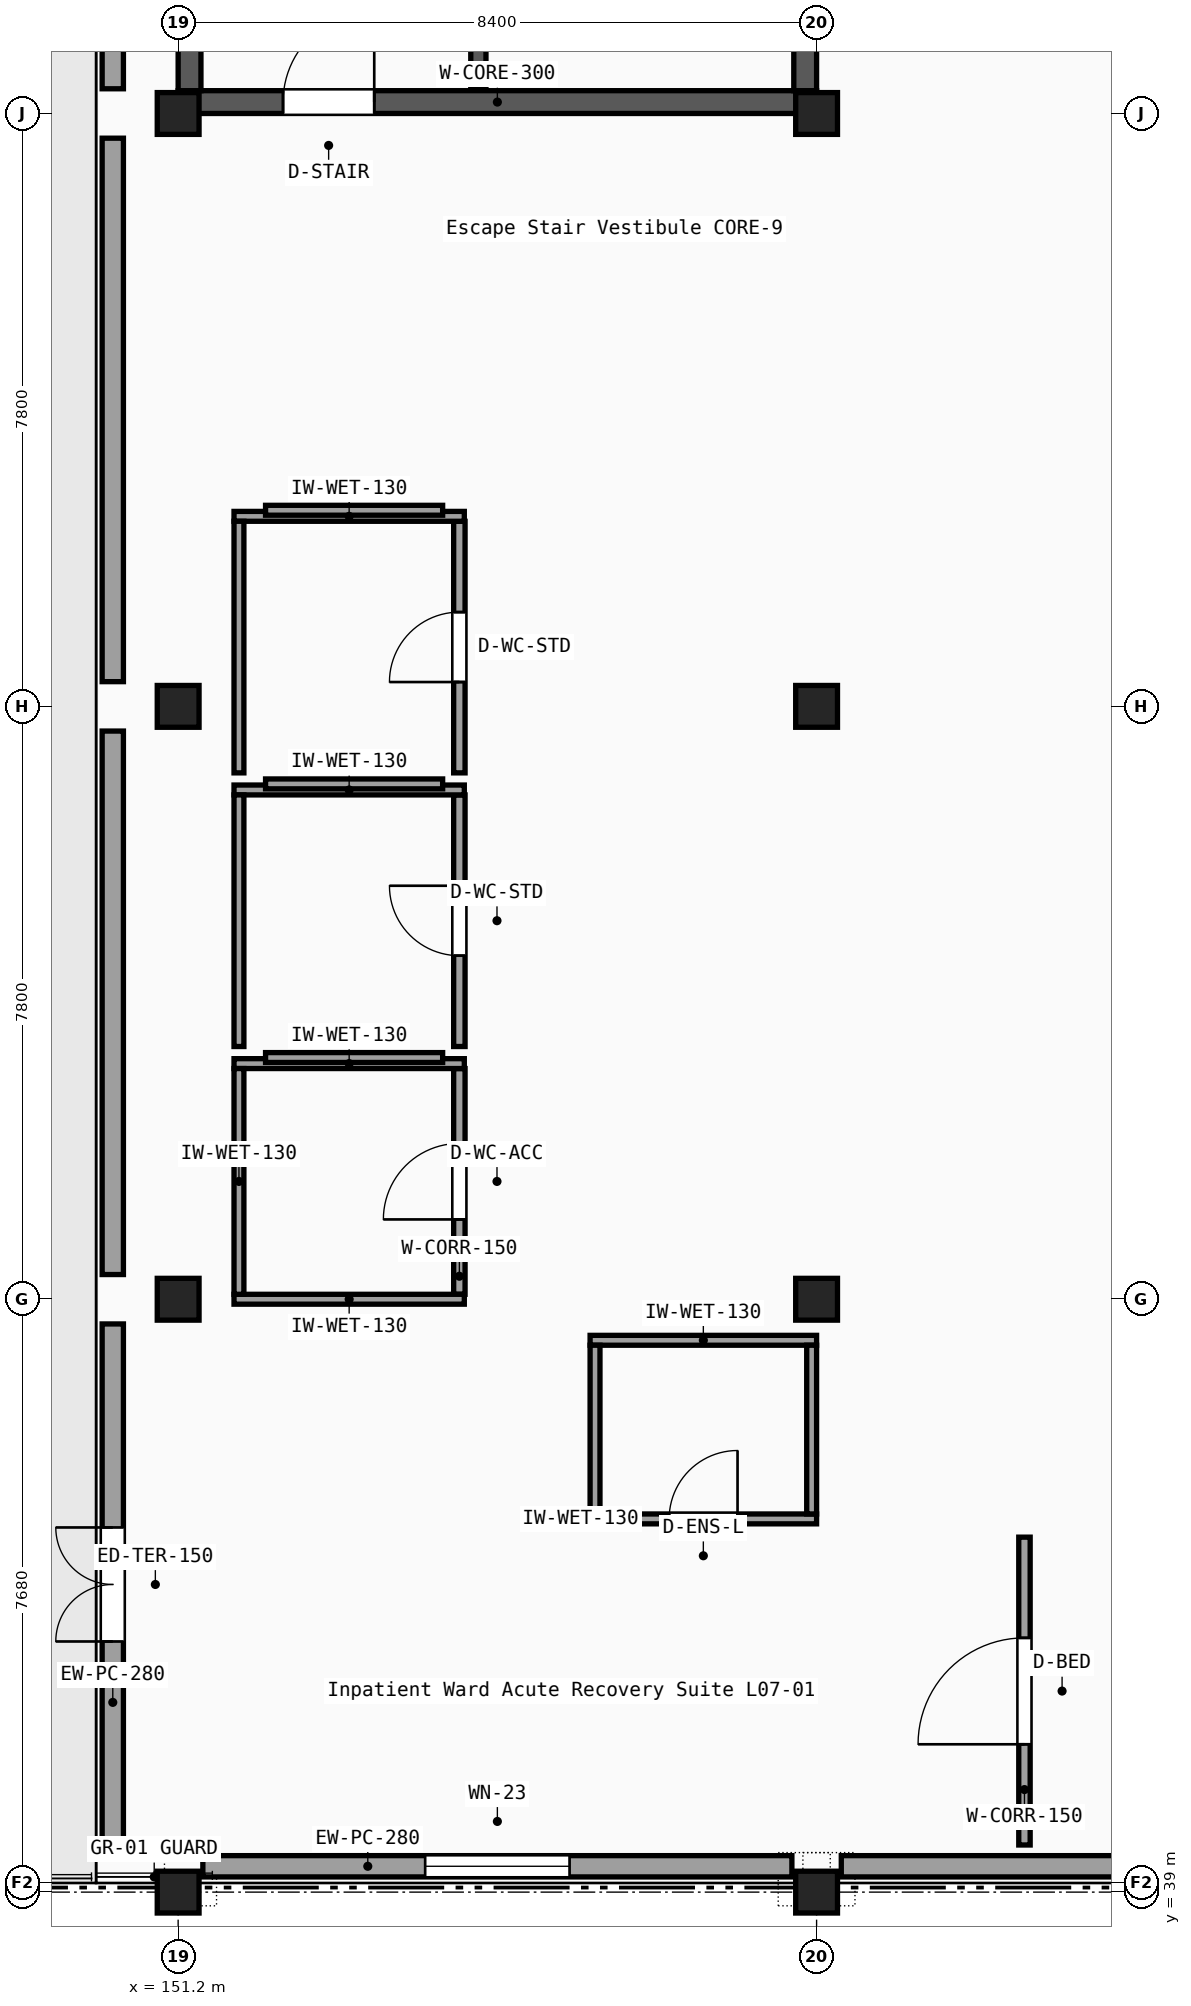
"""IFC4 building model, lengths in metres.
Left out: names, types, materials, properties, quantities, classifications, styles, units other than length and angle.
Written with IfcOpenShell. Run it as: python <this file> out.ifc"""

import sys

from ifc_helpers import new_model, si_unit, direction, frame, frame_2d, origin, origin_2d, place, context, subcontext, project, spatial, rectangle, extrude, element, fill, save


model = new_model("IFC4")
c1 = context("Model", 3, precision=1e-05, world=origin(), true_north=direction((0.0, 1.0)))
c2 = subcontext(c1, "Body", "Model", "MODEL_VIEW")
j1 = project(units=[si_unit("LENGTHUNIT", "METRE"), si_unit("PLANEANGLEUNIT", "RADIAN")], contexts=[c1])
p1 = place(None, origin())
s1 = spatial("IfcSite", under=j1, at=p1, CompositionType="ELEMENT")
p2 = place(p1, origin())
s2 = spatial("IfcBuilding", under=s1, at=p2, CompositionType="ELEMENT")
p3 = place(p2, frame((0.0, 0.0, 31.05)))
s3 = spatial("IfcBuildingStorey", under=s2, at=p3, CompositionType="ELEMENT", Elevation=31.05)
for number, where, z_axis, x_axis in (
    (1, (151.2, 39.0, 0.0), (0.0, 0.0, 1.0), (1.0, 0.0, 0.0)),
    (2, (151.2, 46.8, 0.0), (0.0, 0.0, 1.0), (1.0, 0.0, 0.0)),
    (3, (151.2, 54.6, 0.0), (0.0, 0.0, 1.0), (1.0, 0.0, 0.0)),
    (4, (151.2, 62.4, 0.0), (0.0, 0.0, 1.0), (1.0, 0.0, 0.0)),
    (5, (159.6, 39.0, 0.0), (0.0, 0.0, 1.0), (1.0, 0.0, 0.0)),
    (6, (159.6, 46.8, 0.0), (0.0, 0.0, 1.0), (1.0, 0.0, 0.0)),
    (7, (159.6, 54.6, 0.0), (0.0, 0.0, 1.0), (1.0, 0.0, 0.0)),
    (8, (159.6, 62.4, 0.0), (0.0, 0.0, 1.0), (1.0, 0.0, 0.0)),
):
    element("IfcColumn", number, at=place(p3, frame(where, z_axis=z_axis, x_axis=x_axis)), inside=s3, PredefinedType="COLUMN", context=c2, shape_type="SweptSolid", body=[
        extrude(rectangle(XDim=0.55, YDim=0.55, at=origin_2d()), origin(), (0.0, 0.0, 1.0), 4.05),
    ])
p4 = place(p3, frame((150.34, 39.56, 0.0), z_axis=(0.0, 0.0, 1.0), x_axis=(0.0, 1.0, 0.0)))
e9 = element("IfcWall", 9, at=p4, inside=s3, PredefinedType="SOLIDWALL", context=c2, shape_type="SweptSolid", body=[
    extrude(rectangle(XDim=6.915, YDim=0.28, at=frame_2d((3.458, 0.0))), origin(), (0.0, 0.0, 1.0), 3.77),
])
p5 = place(p4, frame((2.738, 0.0, 0.0)))
e10 = element("IfcOpeningElement", 10, at=p5, cuts=e9, PredefinedType="OPENING", context=c2, shape_type="SweptSolid", body=[
    extrude(rectangle(XDim=1.5, YDim=2.2, at=frame_2d((0.75, 1.1))), frame((0.0, 0.15, 0.0), z_axis=(0.0, -1.0, 0.0), x_axis=(1.0, 0.0, 0.0)), (0.0, 0.0, 1.0), 0.3),
])
for number, where, z_axis, x_axis in (
    (11, (150.34, 47.125, 0.0), (0.0, 0.0, 1.0), (0.0, 1.0, 0.0)),
    (12, (150.34, 54.925, 0.0), (0.0, 0.0, 1.0), (0.0, 1.0, 0.0)),
    (13, (150.34, 62.725, 0.0), (0.0, 0.0, 1.0), (0.0, 1.0, 0.0)),
):
    element("IfcWall", number, at=place(p3, frame(where, z_axis=z_axis, x_axis=x_axis)), inside=s3, PredefinedType="SOLIDWALL", context=c2, shape_type="SweptSolid", body=[
        extrude(rectangle(XDim=7.15, YDim=0.28, at=frame_2d((3.575, 0.0))), origin(), (0.0, 0.0, 1.0), 3.77),
    ])
p6 = place(p3, frame((151.525, 39.34, 0.0), z_axis=(0.0, 0.0, 1.0), x_axis=(1.0, 0.0, 0.0)))
e14 = element("IfcWall", 14, at=p6, inside=s3, PredefinedType="SOLIDWALL", context=c2, shape_type="SweptSolid", body=[
    extrude(rectangle(XDim=7.75, YDim=0.28, at=frame_2d((3.875, 0.0))), origin(), (0.0, 0.0, 1.0), 3.34),
])
p7 = place(p6, frame((2.925, 0.0, 0.85)))
e15 = element("IfcOpeningElement", 15, at=p7, cuts=e14, PredefinedType="OPENING", context=c2, shape_type="SweptSolid", body=[
    extrude(rectangle(XDim=1.9, YDim=1.65, at=frame_2d((0.95, 0.825))), frame((0.0, 0.15, 0.0), z_axis=(0.0, -1.0, 0.0), x_axis=(1.0, 0.0, 0.0)), (0.0, 0.0, 1.0), 0.3),
])
p8 = place(p3, frame((159.925, 39.34, 0.0), z_axis=(0.0, 0.0, 1.0), x_axis=(1.0, 0.0, 0.0)))
e16 = element("IfcWall", 16, at=p8, inside=s3, PredefinedType="SOLIDWALL", context=c2, shape_type="SweptSolid", body=[
    extrude(rectangle(XDim=7.875, YDim=0.28, at=frame_2d((3.938, 0.0))), origin(), (0.0, 0.0, 1.0), 3.34),
])
p9 = place(p3, frame((151.2, 62.55, 0.0), z_axis=(0.0, 0.0, 1.0), x_axis=(1.0, 0.0, 0.0)))
e17 = element("IfcWall", 17, at=p9, inside=s3, PredefinedType="SHEAR", context=c2, shape_type="SweptSolid", body=[
    extrude(rectangle(XDim=8.4, YDim=0.3, at=frame_2d((4.2, 0.0))), origin(), (0.0, 0.0, 1.0), 3.81),
])
p10 = place(p9, frame((1.38, 0.0, 0.0)))
e18 = element("IfcOpeningElement", 18, at=p10, cuts=e17, PredefinedType="OPENING", context=c2, shape_type="SweptSolid", body=[
    extrude(rectangle(XDim=1.2, YDim=2.15, at=frame_2d((0.6, 1.075))), frame((0.0, 0.16, 0.0), z_axis=(0.0, -1.0, 0.0), x_axis=(1.0, 0.0, 0.0)), (0.0, 0.0, 1.0), 0.32),
])
for number, where, z_axis, x_axis in (
    (19, (151.35, 62.7, 0.0), (0.0, 0.0, 1.0), (0.0, 1.0, 0.0)),
    (20, (159.45, 62.7, 0.0), (0.0, 0.0, 1.0), (0.0, 1.0, 0.0)),
):
    element("IfcWall", number, at=place(p3, frame(where, z_axis=z_axis, x_axis=x_axis)), inside=s3, PredefinedType="SHEAR", context=c2, shape_type="SweptSolid", body=[
        extrude(rectangle(XDim=7.2, YDim=0.3, at=frame_2d((3.6, 0.0))), origin(), (0.0, 0.0, 1.0), 3.81),
    ])
p11 = place(p3, frame((155.15, 62.72, 0.0), z_axis=(0.0, 0.0, 1.0), x_axis=(0.0, 1.0, 0.0)))
e21 = element("IfcWall", 21, at=p11, inside=s3, PredefinedType="SHEAR", context=c2, shape_type="SweptSolid", body=[
    extrude(rectangle(XDim=7.16, YDim=0.2, at=frame_2d((3.58, 0.0))), origin(), (0.0, 0.0, 1.0), 3.81),
])
p12 = place(p3, frame((154.9, 46.865, 0.0), z_axis=(0.0, 0.0, 1.0), x_axis=(0.0, 1.0, 0.0)))
e22 = element("IfcWall", 22, at=p12, inside=s3, PredefinedType="PARTITIONING", context=c2, shape_type="SweptSolid", body=[
    extrude(rectangle(XDim=2.97, YDim=0.15, at=frame_2d((1.485, 0.0))), origin(), (0.0, 0.0, 1.0), 3.34),
])
p13 = place(p12, frame((0.985, 0.0, 0.0)))
e23 = element("IfcOpeningElement", 23, at=p13, cuts=e22, PredefinedType="OPENING", context=c2, shape_type="SweptSolid", body=[
    extrude(rectangle(XDim=1.0, YDim=2.15, at=frame_2d((0.5, 1.075))), frame((0.0, 0.085, 0.0), z_axis=(0.0, -1.0, 0.0), x_axis=(1.0, 0.0, 0.0)), (0.0, 0.0, 1.0), 0.17),
])
p14 = place(p3, frame((151.935, 46.8, 0.0), z_axis=(0.0, 0.0, 1.0), x_axis=(1.0, 0.0, 0.0)))
e24 = element("IfcWall", 24, at=p14, inside=s3, PredefinedType="PARTITIONING", context=c2, shape_type="SweptSolid", body=[
    extrude(rectangle(XDim=3.03, YDim=0.13, at=frame_2d((1.515, 0.0))), origin(), (0.0, 0.0, 1.0), 3.34),
])
p15 = place(p3, frame((151.935, 49.9, 0.0), z_axis=(0.0, 0.0, 1.0), x_axis=(1.0, 0.0, 0.0)))
e25 = element("IfcWall", 25, at=p15, inside=s3, PredefinedType="PARTITIONING", context=c2, shape_type="SweptSolid", body=[
    extrude(rectangle(XDim=3.03, YDim=0.13, at=frame_2d((1.515, 0.0))), origin(), (0.0, 0.0, 1.0), 3.77),
])
p16 = place(p3, frame((152.0, 46.865, 0.0), z_axis=(0.0, 0.0, 1.0), x_axis=(0.0, 1.0, 0.0)))
e26 = element("IfcWall", 26, at=p16, inside=s3, PredefinedType="PARTITIONING", context=c2, shape_type="SweptSolid", body=[
    extrude(rectangle(XDim=2.97, YDim=0.13, at=frame_2d((1.485, 0.0))), origin(), (0.0, 0.0, 1.0), 3.34),
])
p17 = place(p3, frame((152.35, 49.98, 0.0), z_axis=(0.0, 0.0, 1.0), x_axis=(1.0, 0.0, 0.0)))
e27 = element("IfcWall", 27, at=p17, inside=s3, PredefinedType="PARTITIONING", context=c2, shape_type="SweptSolid", body=[
    extrude(rectangle(XDim=2.33, YDim=0.13, at=frame_2d((1.165, 0.0))), origin(), (0.0, 0.0, 1.0), 3.77),
])
p18 = place(p3, frame((154.9, 50.125, 0.0), z_axis=(0.0, 0.0, 1.0), x_axis=(0.0, 1.0, 0.0)))
e28 = element("IfcWall", 28, at=p18, inside=s3, PredefinedType="PARTITIONING", context=c2, shape_type="SweptSolid", body=[
    extrude(rectangle(XDim=3.31, YDim=0.15, at=frame_2d((1.655, 0.0))), origin(), (0.0, 0.0, 1.0), 3.77),
])
p19 = place(p18, frame((1.195, 0.0, 0.0)))
e29 = element("IfcOpeningElement", 29, at=p19, cuts=e28, PredefinedType="OPENING", context=c2, shape_type="SweptSolid", body=[
    extrude(rectangle(XDim=0.92, YDim=2.15, at=frame_2d((0.46, 1.075))), frame((0.0, 0.085, 0.0), z_axis=(0.0, -1.0, 0.0), x_axis=(1.0, 0.0, 0.0)), (0.0, 0.0, 1.0), 0.17),
])
p20 = place(p3, frame((151.935, 53.5, 0.0), z_axis=(0.0, 0.0, 1.0), x_axis=(1.0, 0.0, 0.0)))
e30 = element("IfcWall", 30, at=p20, inside=s3, PredefinedType="PARTITIONING", context=c2, shape_type="SweptSolid", body=[
    extrude(rectangle(XDim=3.03, YDim=0.13, at=frame_2d((1.515, 0.0))), origin(), (0.0, 0.0, 1.0), 3.77),
])
p21 = place(p3, frame((152.0, 50.125, 0.0), z_axis=(0.0, 0.0, 1.0), x_axis=(0.0, 1.0, 0.0)))
e31 = element("IfcWall", 31, at=p21, inside=s3, PredefinedType="PARTITIONING", context=c2, shape_type="SweptSolid", body=[
    extrude(rectangle(XDim=3.31, YDim=0.13, at=frame_2d((1.655, 0.0))), origin(), (0.0, 0.0, 1.0), 3.77),
])
p22 = place(p3, frame((152.35, 53.58, 0.0), z_axis=(0.0, 0.0, 1.0), x_axis=(1.0, 0.0, 0.0)))
e32 = element("IfcWall", 32, at=p22, inside=s3, PredefinedType="PARTITIONING", context=c2, shape_type="SweptSolid", body=[
    extrude(rectangle(XDim=2.33, YDim=0.13, at=frame_2d((1.165, 0.0))), origin(), (0.0, 0.0, 1.0), 3.77),
])
p23 = place(p3, frame((154.9, 53.725, 0.0), z_axis=(0.0, 0.0, 1.0), x_axis=(0.0, 1.0, 0.0)))
e33 = element("IfcWall", 33, at=p23, inside=s3, PredefinedType="PARTITIONING", context=c2, shape_type="SweptSolid", body=[
    extrude(rectangle(XDim=3.31, YDim=0.15, at=frame_2d((1.655, 0.0))), origin(), (0.0, 0.0, 1.0), 3.34),
])
p24 = place(p23, frame((1.195, 0.0, 0.0)))
e34 = element("IfcOpeningElement", 34, at=p24, cuts=e33, PredefinedType="OPENING", context=c2, shape_type="SweptSolid", body=[
    extrude(rectangle(XDim=0.92, YDim=2.15, at=frame_2d((0.46, 1.075))), frame((0.0, 0.085, 0.0), z_axis=(0.0, -1.0, 0.0), x_axis=(1.0, 0.0, 0.0)), (0.0, 0.0, 1.0), 0.17),
])
p25 = place(p3, frame((151.935, 57.1, 0.0), z_axis=(0.0, 0.0, 1.0), x_axis=(1.0, 0.0, 0.0)))
e35 = element("IfcWall", 35, at=p25, inside=s3, PredefinedType="PARTITIONING", context=c2, shape_type="SweptSolid", body=[
    extrude(rectangle(XDim=3.03, YDim=0.13, at=frame_2d((1.515, 0.0))), origin(), (0.0, 0.0, 1.0), 3.77),
])
p26 = place(p3, frame((152.0, 53.725, 0.0), z_axis=(0.0, 0.0, 1.0), x_axis=(0.0, 1.0, 0.0)))
e36 = element("IfcWall", 36, at=p26, inside=s3, PredefinedType="PARTITIONING", context=c2, shape_type="SweptSolid", body=[
    extrude(rectangle(XDim=3.31, YDim=0.13, at=frame_2d((1.655, 0.0))), origin(), (0.0, 0.0, 1.0), 3.34),
])
p27 = place(p3, frame((152.35, 57.18, 0.0), z_axis=(0.0, 0.0, 1.0), x_axis=(1.0, 0.0, 0.0)))
e37 = element("IfcWall", 37, at=p27, inside=s3, PredefinedType="PARTITIONING", context=c2, shape_type="SweptSolid", body=[
    extrude(rectangle(XDim=2.33, YDim=0.13, at=frame_2d((1.165, 0.0))), origin(), (0.0, 0.0, 1.0), 3.77),
])
p28 = place(p3, frame((162.335, 39.62, 0.0), z_axis=(0.0, 0.0, 1.0), x_axis=(0.0, 1.0, 0.0)))
e38 = element("IfcWall", 38, at=p28, inside=s3, PredefinedType="PARTITIONING", context=c2, shape_type="SweptSolid", body=[
    extrude(rectangle(XDim=4.05, YDim=0.15, at=frame_2d((2.025, 0.0))), origin(), (0.0, 0.0, 1.0), 3.77),
])
p29 = place(p28, frame((1.325, 0.0, 0.0)))
e39 = element("IfcOpeningElement", 39, at=p29, cuts=e38, PredefinedType="OPENING", context=c2, shape_type="SweptSolid", body=[
    extrude(rectangle(XDim=1.4, YDim=2.2, at=frame_2d((0.7, 1.1))), frame((0.0, 0.085, 0.0), z_axis=(0.0, -1.0, 0.0), x_axis=(1.0, 0.0, 0.0)), (0.0, 0.0, 1.0), 0.17),
])
p30 = place(p3, frame((156.62, 43.91, 0.0), z_axis=(0.0, 0.0, 1.0), x_axis=(1.0, 0.0, 0.0)))
e40 = element("IfcWall", 40, at=p30, inside=s3, PredefinedType="PARTITIONING", context=c2, shape_type="SweptSolid", body=[
    extrude(rectangle(XDim=2.98, YDim=0.13, at=frame_2d((1.49, 0.0))), origin(), (0.0, 0.0, 1.0), 3.55),
])
p31 = place(p30, frame((1.04, 0.0, 0.0)))
e41 = element("IfcOpeningElement", 41, at=p31, cuts=e40, PredefinedType="OPENING", context=c2, shape_type="SweptSolid", body=[
    extrude(rectangle(XDim=0.9, YDim=2.1, at=frame_2d((0.45, 1.05))), frame((0.0, 0.075, 0.0), z_axis=(0.0, -1.0, 0.0), x_axis=(1.0, 0.0, 0.0)), (0.0, 0.0, 1.0), 0.15),
])
p32 = place(p3, frame((156.62, 46.26, 0.0), z_axis=(0.0, 0.0, 1.0), x_axis=(1.0, 0.0, 0.0)))
e42 = element("IfcWall", 42, at=p32, inside=s3, PredefinedType="PARTITIONING", context=c2, shape_type="SweptSolid", body=[
    extrude(rectangle(XDim=2.98, YDim=0.13, at=frame_2d((1.49, 0.0))), origin(), (0.0, 0.0, 1.0), 3.55),
])
p33 = place(p3, frame((156.685, 43.975, 0.0), z_axis=(0.0, 0.0, 1.0), x_axis=(0.0, 1.0, 0.0)))
e43 = element("IfcWall", 43, at=p33, inside=s3, PredefinedType="PARTITIONING", context=c2, shape_type="SweptSolid", body=[
    extrude(rectangle(XDim=2.22, YDim=0.13, at=frame_2d((1.11, 0.0))), origin(), (0.0, 0.0, 1.0), 3.77),
])
p34 = place(p3, frame((159.535, 43.975, 0.0), z_axis=(0.0, 0.0, 1.0), x_axis=(0.0, 1.0, 0.0)))
e44 = element("IfcWall", 44, at=p34, inside=s3, PredefinedType="PARTITIONING", context=c2, shape_type="SweptSolid", body=[
    extrude(rectangle(XDim=2.22, YDim=0.13, at=frame_2d((1.11, 0.0))), origin(), (0.0, 0.0, 1.0), 3.55),
])
p35 = place(p5, origin())
e45 = element("IfcDoor", 45, at=p35, inside=s3, OperationType="DOUBLE_DOOR_SINGLE_SWING", PredefinedType="DOOR", context=c2, shape_type="SweptSolid", body=[
    extrude(rectangle(XDim=1.5, YDim=2.2, at=frame_2d((0.75, 1.1))), frame((0.0, 0.025, 0.0), z_axis=(0.0, -1.0, 0.0), x_axis=(1.0, 0.0, 0.0)), (0.0, 0.0, 1.0), 0.05),
])
fill(e10, e45)
p36 = place(p7, origin())
e46 = element("IfcWindow", 46, at=p36, inside=s3, PartitioningType="SINGLE_PANEL", PredefinedType="WINDOW", context=c2, shape_type="SweptSolid", body=[
    extrude(rectangle(XDim=1.9, YDim=1.65, at=frame_2d((0.95, 0.825))), frame((0.0, 0.03, 0.0), z_axis=(0.0, -1.0, 0.0), x_axis=(1.0, 0.0, 0.0)), (0.0, 0.0, 1.0), 0.06),
])
fill(e15, e46)
p37 = place(p10, origin())
e47 = element("IfcDoor", 47, at=p37, inside=s3, OperationType="SINGLE_SWING_RIGHT", PredefinedType="DOOR", context=c2, shape_type="SweptSolid", body=[
    extrude(rectangle(XDim=1.2, YDim=2.15, at=frame_2d((0.6, 1.075))), frame((0.0, 0.025, 0.0), z_axis=(0.0, -1.0, 0.0), x_axis=(1.0, 0.0, 0.0)), (0.0, 0.0, 1.0), 0.05),
])
fill(e18, e47)
p38 = place(p13, origin())
e48 = element("IfcDoor", 48, at=p38, inside=s3, OperationType="SINGLE_SWING_LEFT", PredefinedType="DOOR", context=c2, shape_type="SweptSolid", body=[
    extrude(rectangle(XDim=1.0, YDim=2.15, at=frame_2d((0.5, 1.075))), frame((0.0, 0.025, 0.0), z_axis=(0.0, -1.0, 0.0), x_axis=(1.0, 0.0, 0.0)), (0.0, 0.0, 1.0), 0.05),
])
fill(e23, e48)
p39 = place(p19, origin())
e49 = element("IfcDoor", 49, at=p39, inside=s3, OperationType="SINGLE_SWING_RIGHT", PredefinedType="DOOR", context=c2, shape_type="SweptSolid", body=[
    extrude(rectangle(XDim=0.92, YDim=2.15, at=frame_2d((0.46, 1.075))), frame((0.0, 0.025, 0.0), z_axis=(0.0, -1.0, 0.0), x_axis=(1.0, 0.0, 0.0)), (0.0, 0.0, 1.0), 0.05),
])
fill(e29, e49)
p40 = place(p24, origin())
e50 = element("IfcDoor", 50, at=p40, inside=s3, OperationType="SINGLE_SWING_LEFT", PredefinedType="DOOR", context=c2, shape_type="SweptSolid", body=[
    extrude(rectangle(XDim=0.92, YDim=2.15, at=frame_2d((0.46, 1.075))), frame((0.0, 0.025, 0.0), z_axis=(0.0, -1.0, 0.0), x_axis=(1.0, 0.0, 0.0)), (0.0, 0.0, 1.0), 0.05),
])
fill(e34, e50)
p41 = place(p29, origin())
e51 = element("IfcDoor", 51, at=p41, inside=s3, OperationType="SINGLE_SWING_LEFT", PredefinedType="DOOR", context=c2, shape_type="SweptSolid", body=[
    extrude(rectangle(XDim=1.4, YDim=2.2, at=frame_2d((0.7, 1.1))), frame((0.0, 0.025, 0.0), z_axis=(0.0, -1.0, 0.0), x_axis=(1.0, 0.0, 0.0)), (0.0, 0.0, 1.0), 0.05),
])
fill(e39, e51)
p42 = place(p31, origin())
e52 = element("IfcDoor", 52, at=p42, inside=s3, OperationType="SINGLE_SWING_RIGHT", PredefinedType="DOOR", context=c2, shape_type="SweptSolid", body=[
    extrude(rectangle(XDim=0.9, YDim=2.1, at=frame_2d((0.45, 1.05))), frame((0.0, 0.025, 0.0), z_axis=(0.0, -1.0, 0.0), x_axis=(1.0, 0.0, 0.0)), (0.0, 0.0, 1.0), 0.05),
])
fill(e41, e52)
save(model, sys.argv[1])
